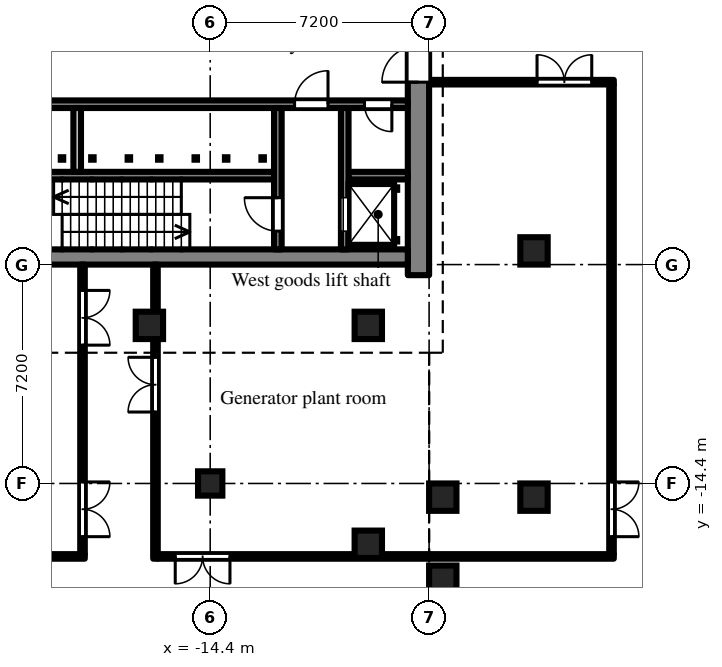
"""IFC4 building model, lengths in metres.
Left out: names, types, materials, properties, quantities, classifications, styles, units other than length and angle.
Written with IfcOpenShell. Run it as: python <this file> out.ifc"""

import sys

from ifc_helpers import new_model, si_unit, direction, frame, frame_2d, origin, origin_2d, place, context, subcontext, project, spatial, rectangle, extrude, element, fill, save


model = new_model("IFC4")
c1 = context("Model", 3, precision=1e-05, world=origin(), true_north=direction((0.0, 1.0)))
c2 = subcontext(c1, "Body", "Model", "MODEL_VIEW")
j1 = project(units=[si_unit("LENGTHUNIT", "METRE"), si_unit("PLANEANGLEUNIT", "RADIAN")], contexts=[c1])
p1 = place(None, origin())
s1 = spatial("IfcSite", under=j1, at=p1, CompositionType="ELEMENT")
p2 = place(p1, origin())
s2 = spatial("IfcBuilding", under=s1, at=p2, CompositionType="ELEMENT")
p3 = place(p2, frame((0.0, 0.0, -4.8)))
s3 = spatial("IfcBuildingStorey", under=s2, at=p3, CompositionType="ELEMENT", Elevation=-4.8)
for number, where, z_axis, x_axis in (
    (1, (-6.75, -17.55, -0.5), (0.0, 0.0, 1.0), (1.0, 0.0, 0.0)),
    (2, (-6.75, -14.85, -0.5), (0.0, 0.0, 1.0), (1.0, 0.0, 0.0)),
    (3, (-3.75, -14.85, -0.5), (0.0, 0.0, 1.0), (1.0, 0.0, 0.0)),
    (4, (-3.75, -6.75, -0.5), (0.0, 0.0, 1.0), (1.0, 0.0, 0.0)),
):
    element("IfcColumn", number, at=place(p3, frame(where, z_axis=z_axis, x_axis=x_axis)), inside=s3, PredefinedType="COLUMN", context=c2, shape_type="SweptSolid", body=[
        extrude(rectangle(XDim=0.9, YDim=0.9, at=origin_2d()), origin(), (0.0, 0.0, 1.0), 5.3),
    ])
p4 = place(p3, frame((-14.4, -14.4, -0.5), z_axis=(0.0, 0.0, 1.0), x_axis=(1.0, 0.0, 0.0)))
e5 = element("IfcColumn", 5, at=p4, inside=s3, PredefinedType="COLUMN", context=c2, shape_type="SweptSolid", body=[
    extrude(rectangle(XDim=0.8, YDim=0.8, at=origin_2d()), origin(), (0.0, 0.0, 1.0), 5.3),
])
for number, where, z_axis, x_axis in (
    (6, (-16.4, -9.2, -0.5), (0.0, 0.0, 1.0), (1.0, 0.0, 0.0)),
    (7, (-9.2, -16.4, -0.5), (0.0, 0.0, 1.0), (1.0, 0.0, 0.0)),
    (8, (-9.2, -9.2, -0.5), (0.0, 0.0, 1.0), (1.0, 0.0, 0.0)),
):
    element("IfcColumn", number, at=place(p3, frame(where, z_axis=z_axis, x_axis=x_axis)), inside=s3, PredefinedType="COLUMN", context=c2, shape_type="SweptSolid", body=[
        extrude(rectangle(XDim=0.9, YDim=0.9, at=origin_2d()), origin(), (0.0, 0.0, 1.0), 5.3),
    ])
p5 = place(p3, frame((-7.55, -7.548, 0.0), z_axis=(0.0, 0.0, 1.0), x_axis=(0.0, 1.0, 0.0)))
e9 = element("IfcWall", 9, at=p5, inside=s3, PredefinedType="SHEAR", context=c2, shape_type="SweptSolid", body=[
    extrude(rectangle(XDim=15.096, YDim=0.7, at=frame_2d((7.548, 0.0))), origin(), (0.0, 0.0, 1.0), 4.35),
])
p6 = place(p5, frame((6.348, 0.0, 0.0)))
e10 = element("IfcOpeningElement", 10, at=p6, cuts=e9, PredefinedType="OPENING", context=c2, shape_type="SweptSolid", body=[
    extrude(rectangle(XDim=2.4, YDim=2.2, at=frame_2d((1.2, 1.1))), frame((0.0, 0.36, 0.0), z_axis=(0.0, -1.0, 0.0), x_axis=(1.0, 0.0, 0.0)), (0.0, 0.0, 1.0), 0.72),
])
p7 = place(p3, frame((-7.9, -6.95, 0.0), z_axis=(0.0, 0.0, 1.0), x_axis=(-1.0, 0.0, 0.0)))
e11 = element("IfcWall", 11, at=p7, inside=s3, PredefinedType="SHEAR", context=c2, shape_type="SweptSolid", body=[
    extrude(rectangle(XDim=12.95, YDim=0.5, at=frame_2d((6.475, 0.0))), origin(), (0.0, 0.0, 1.0), 4.35),
])
p8 = place(p3, frame((-7.9, -1.925, 0.0), z_axis=(0.0, 0.0, 1.0), x_axis=(-1.0, 0.0, 0.0)))
e12 = element("IfcWall", 12, at=p8, inside=s3, PredefinedType="SHEAR", context=c2, shape_type="SweptSolid", body=[
    extrude(rectangle(XDim=12.95, YDim=0.25, at=frame_2d((6.475, 0.0))), origin(), (0.0, 0.0, 1.0), 4.35),
])
p9 = place(p8, frame((0.525, 0.0, 0.0)))
e13 = element("IfcOpeningElement", 13, at=p9, cuts=e12, PredefinedType="OPENING", context=c2, shape_type="SweptSolid", body=[
    extrude(rectangle(XDim=0.9, YDim=2.1, at=frame_2d((0.45, 1.05))), frame((0.0, 0.135, 0.0), z_axis=(0.0, -1.0, 0.0), x_axis=(1.0, 0.0, 0.0)), (0.0, 0.0, 1.0), 0.27),
])
p10 = place(p8, frame((2.625, 0.0, 0.0)))
e14 = element("IfcOpeningElement", 14, at=p10, cuts=e12, PredefinedType="OPENING", context=c2, shape_type="SweptSolid", body=[
    extrude(rectangle(XDim=1.1, YDim=2.1, at=frame_2d((0.55, 1.05))), frame((0.0, 0.135, 0.0), z_axis=(0.0, -1.0, 0.0), x_axis=(1.0, 0.0, 0.0)), (0.0, 0.0, 1.0), 0.27),
])
p11 = place(p3, frame((-7.9, -4.275, 0.0), z_axis=(0.0, 0.0, 1.0), x_axis=(-1.0, 0.0, 0.0)))
e15 = element("IfcWall", 15, at=p11, inside=s3, PredefinedType="SHEAR", context=c2, shape_type="SweptSolid", body=[
    extrude(rectangle(XDim=1.95, YDim=0.25, at=frame_2d((0.975, 0.0))), origin(), (0.0, 0.0, 1.0), 4.35),
])
p12 = place(p3, frame((-12.3, -4.275, 0.0), z_axis=(0.0, 0.0, 1.0), x_axis=(-1.0, 0.0, 0.0)))
e16 = element("IfcWall", 16, at=p12, inside=s3, PredefinedType="SHEAR", context=c2, shape_type="SweptSolid", body=[
    extrude(rectangle(XDim=8.55, YDim=0.25, at=frame_2d((4.275, 0.0))), origin(), (0.0, 0.0, 1.0), 4.35),
])
p13 = place(p3, frame((-9.975, -2.05, 0.0), z_axis=(0.0, 0.0, 1.0), x_axis=(0.0, -1.0, 0.0)))
e17 = element("IfcWall", 17, at=p13, inside=s3, PredefinedType="SHEAR", context=c2, shape_type="SweptSolid", body=[
    extrude(rectangle(XDim=4.65, YDim=0.25, at=frame_2d((2.325, 0.0))), origin(), (0.0, 0.0, 1.0), 4.35),
])
p14 = place(p13, frame((2.95, 0.0, 0.0)))
e18 = element("IfcOpeningElement", 18, at=p14, cuts=e17, PredefinedType="OPENING", context=c2, shape_type="SweptSolid", body=[
    extrude(rectangle(XDim=1.1, YDim=2.1, at=frame_2d((0.55, 1.05))), frame((0.0, 0.135, 0.0), z_axis=(0.0, -1.0, 0.0), x_axis=(1.0, 0.0, 0.0)), (0.0, 0.0, 1.0), 0.27),
])
p15 = place(p3, frame((-12.175, -2.05, 0.0), z_axis=(0.0, 0.0, 1.0), x_axis=(0.0, -1.0, 0.0)))
e19 = element("IfcWall", 19, at=p15, inside=s3, PredefinedType="SHEAR", context=c2, shape_type="SweptSolid", body=[
    extrude(rectangle(XDim=4.65, YDim=0.25, at=frame_2d((2.325, 0.0))), origin(), (0.0, 0.0, 1.0), 4.35),
])
p16 = place(p15, frame((2.95, 0.0, 0.0)))
e20 = element("IfcOpeningElement", 20, at=p16, cuts=e19, PredefinedType="OPENING", context=c2, shape_type="SweptSolid", body=[
    extrude(rectangle(XDim=1.1, YDim=2.1, at=frame_2d((0.55, 1.05))), frame((0.0, 0.135, 0.0), z_axis=(0.0, -1.0, 0.0), x_axis=(1.0, 0.0, 0.0)), (0.0, 0.0, 1.0), 0.27),
])
p17 = place(p3, frame((-18.775, -2.05, 0.0), z_axis=(0.0, 0.0, 1.0), x_axis=(0.0, -1.0, 0.0)))
e21 = element("IfcWall", 21, at=p17, inside=s3, PredefinedType="PARTITIONING", context=c2, shape_type="SweptSolid", body=[
    extrude(rectangle(XDim=2.1, YDim=0.25, at=frame_2d((1.05, 0.0))), origin(), (0.0, 0.0, 1.0), 4.35),
])
p18 = place(p3, frame((-31.125, -16.8, 0.0), z_axis=(0.0, 0.0, 1.0), x_axis=(1.0, 0.0, 0.0)))
e22 = element("IfcWall", 22, at=p18, inside=s3, PredefinedType="PARTITIONING", context=c2, shape_type="SweptSolid", body=[
    extrude(rectangle(XDim=12.6, YDim=0.15, at=frame_2d((6.3, 0.0))), origin(), (0.0, 0.0, 1.0), 4.35),
])
p19 = place(p18, frame((0.575, 0.0, 0.0)))
e23 = element("IfcOpeningElement", 23, at=p19, cuts=e22, PredefinedType="OPENING", context=c2, shape_type="SweptSolid", body=[
    extrude(rectangle(XDim=1.8, YDim=2.1, at=frame_2d((0.9, 1.05))), frame((0.0, 0.085, 0.0), z_axis=(0.0, -1.0, 0.0), x_axis=(1.0, 0.0, 0.0)), (0.0, 0.0, 1.0), 0.17),
])
p20 = place(p3, frame((-18.6, -16.725, 0.0), z_axis=(0.0, 0.0, 1.0), x_axis=(0.0, 1.0, 0.0)))
e24 = element("IfcWall", 24, at=p20, inside=s3, PredefinedType="PARTITIONING", context=c2, shape_type="SweptSolid", body=[
    extrude(rectangle(XDim=9.525, YDim=0.15, at=frame_2d((4.763, 0.0))), origin(), (0.0, 0.0, 1.0), 4.35),
])
p21 = place(p20, frame((0.575, 0.0, 0.0)))
e25 = element("IfcOpeningElement", 25, at=p21, cuts=e24, PredefinedType="OPENING", context=c2, shape_type="SweptSolid", body=[
    extrude(rectangle(XDim=1.8, YDim=2.1, at=frame_2d((0.9, 1.05))), frame((0.0, 0.085, 0.0), z_axis=(0.0, -1.0, 0.0), x_axis=(1.0, 0.0, 0.0)), (0.0, 0.0, 1.0), 0.17),
])
p22 = place(p20, frame((6.875, 0.0, 0.0)))
e26 = element("IfcOpeningElement", 26, at=p22, cuts=e24, PredefinedType="OPENING", context=c2, shape_type="SweptSolid", body=[
    extrude(rectangle(XDim=1.8, YDim=2.1, at=frame_2d((0.9, 1.05))), frame((0.0, 0.085, 0.0), z_axis=(0.0, -1.0, 0.0), x_axis=(1.0, 0.0, 0.0)), (0.0, 0.0, 1.0), 0.17),
])
p23 = place(p3, frame((-16.2, -16.875, 0.0), z_axis=(0.0, 0.0, 1.0), x_axis=(0.0, 1.0, 0.0)))
e27 = element("IfcWall", 27, at=p23, inside=s3, PredefinedType="PARTITIONING", context=c2, shape_type="SweptSolid", body=[
    extrude(rectangle(XDim=9.675, YDim=0.15, at=frame_2d((4.837, 0.0))), origin(), (0.0, 0.0, 1.0), 4.35),
])
p24 = place(p23, frame((4.825, 0.0, 0.0)))
e28 = element("IfcOpeningElement", 28, at=p24, cuts=e27, PredefinedType="OPENING", context=c2, shape_type="SweptSolid", body=[
    extrude(rectangle(XDim=1.8, YDim=2.1, at=frame_2d((0.9, 1.05))), frame((0.0, 0.085, 0.0), z_axis=(0.0, -1.0, 0.0), x_axis=(1.0, 0.0, 0.0)), (0.0, 0.0, 1.0), 0.17),
])
p25 = place(p3, frame((-16.125, -16.8, 0.0), z_axis=(0.0, 0.0, 1.0), x_axis=(1.0, 0.0, 0.0)))
e29 = element("IfcWall", 29, at=p25, inside=s3, PredefinedType="PARTITIONING", context=c2, shape_type="SweptSolid", body=[
    extrude(rectangle(XDim=15.0, YDim=0.15, at=frame_2d((7.5, 0.0))), origin(), (0.0, 0.0, 1.0), 4.35),
])
p26 = place(p25, frame((0.575, 0.0, 0.0)))
e30 = element("IfcOpeningElement", 30, at=p26, cuts=e29, PredefinedType="OPENING", context=c2, shape_type="SweptSolid", body=[
    extrude(rectangle(XDim=1.8, YDim=2.1, at=frame_2d((0.9, 1.05))), frame((0.0, 0.085, 0.0), z_axis=(0.0, -1.0, 0.0), x_axis=(1.0, 0.0, 0.0)), (0.0, 0.0, 1.0), 0.17),
])
p27 = place(p3, frame((-7.2, -1.2, 0.0), z_axis=(0.0, 0.0, 1.0), x_axis=(1.0, 0.0, 0.0)))
e31 = element("IfcWall", 31, at=p27, inside=s3, PredefinedType="PARTITIONING", context=c2, shape_type="SweptSolid", body=[
    extrude(rectangle(XDim=6.075, YDim=0.15, at=frame_2d((3.038, 0.0))), origin(), (0.0, 0.0, 1.0), 4.35),
])
p28 = place(p27, frame((3.55, 0.0, 0.0)))
e32 = element("IfcOpeningElement", 32, at=p28, cuts=e31, PredefinedType="OPENING", context=c2, shape_type="SweptSolid", body=[
    extrude(rectangle(XDim=1.8, YDim=2.1, at=frame_2d((0.9, 1.05))), frame((0.0, 0.085, 0.0), z_axis=(0.0, -1.0, 0.0), x_axis=(1.0, 0.0, 0.0)), (0.0, 0.0, 1.0), 0.17),
])
p29 = place(p3, frame((-1.2, -16.725, 0.0), z_axis=(0.0, 0.0, 1.0), x_axis=(0.0, 1.0, 0.0)))
e33 = element("IfcWall", 33, at=p29, inside=s3, PredefinedType="PARTITIONING", context=c2, shape_type="SweptSolid", body=[
    extrude(rectangle(XDim=15.45, YDim=0.15, at=frame_2d((7.725, 0.0))), origin(), (0.0, 0.0, 1.0), 4.35),
])
p30 = place(p29, frame((0.575, 0.0, 0.0)))
e34 = element("IfcOpeningElement", 34, at=p30, cuts=e33, PredefinedType="OPENING", context=c2, shape_type="SweptSolid", body=[
    extrude(rectangle(XDim=1.8, YDim=2.1, at=frame_2d((0.9, 1.05))), frame((0.0, 0.085, 0.0), z_axis=(0.0, -1.0, 0.0), x_axis=(1.0, 0.0, 0.0)), (0.0, 0.0, 1.0), 0.17),
])
p31 = place(p14, origin())
e35 = element("IfcDoor", 35, at=p31, inside=s3, OperationType="SLIDING_TO_LEFT", PredefinedType="DOOR", context=c2, shape_type="SweptSolid", body=[
    extrude(rectangle(XDim=1.1, YDim=2.1, at=frame_2d((0.55, 1.05))), frame((0.0, 0.025, 0.0), z_axis=(0.0, -1.0, 0.0), x_axis=(1.0, 0.0, 0.0)), (0.0, 0.0, 1.0), 0.05),
])
fill(e18, e35)
p32 = place(p16, frame((1.1, 0.0, 0.0), z_axis=(0.0, 0.0, 1.0), x_axis=(-1.0, 0.0, 0.0)))
e36 = element("IfcDoor", 36, at=p32, inside=s3, OperationType="SINGLE_SWING_RIGHT", PredefinedType="DOOR", context=c2, shape_type="SweptSolid", body=[
    extrude(rectangle(XDim=1.1, YDim=2.1, at=frame_2d((0.55, 1.05))), frame((0.0, 0.025, 0.0), z_axis=(0.0, -1.0, 0.0), x_axis=(1.0, 0.0, 0.0)), (0.0, 0.0, 1.0), 0.05),
])
fill(e20, e36)
p33 = place(p9, origin())
e37 = element("IfcDoor", 37, at=p33, inside=s3, OperationType="SINGLE_SWING_LEFT", PredefinedType="DOOR", context=c2, shape_type="SweptSolid", body=[
    extrude(rectangle(XDim=0.9, YDim=2.1, at=frame_2d((0.45, 1.05))), frame((0.0, 0.025, 0.0), z_axis=(0.0, -1.0, 0.0), x_axis=(1.0, 0.0, 0.0)), (0.0, 0.0, 1.0), 0.05),
])
fill(e13, e37)
p34 = place(p10, frame((1.1, 0.0, 0.0), z_axis=(0.0, 0.0, 1.0), x_axis=(-1.0, 0.0, 0.0)))
e38 = element("IfcDoor", 38, at=p34, inside=s3, OperationType="SINGLE_SWING_RIGHT", PredefinedType="DOOR", context=c2, shape_type="SweptSolid", body=[
    extrude(rectangle(XDim=1.1, YDim=2.1, at=frame_2d((0.55, 1.05))), frame((0.0, 0.025, 0.0), z_axis=(0.0, -1.0, 0.0), x_axis=(1.0, 0.0, 0.0)), (0.0, 0.0, 1.0), 0.05),
])
fill(e14, e38)
p35 = place(p6, origin())
e39 = element("IfcDoor", 39, at=p35, inside=s3, OperationType="DOUBLE_DOOR_DOUBLE_SWING", PredefinedType="DOOR", context=c2, shape_type="SweptSolid", body=[
    extrude(rectangle(XDim=2.4, YDim=2.2, at=frame_2d((1.2, 1.1))), frame((0.0, 0.025, 0.0), z_axis=(0.0, -1.0, 0.0), x_axis=(1.0, 0.0, 0.0)), (0.0, 0.0, 1.0), 0.05),
])
fill(e10, e39)
p36 = place(p24, origin())
e40 = element("IfcDoor", 40, at=p36, inside=s3, OperationType="DOUBLE_DOOR_DOUBLE_SWING", PredefinedType="DOOR", context=c2, shape_type="SweptSolid", body=[
    extrude(rectangle(XDim=1.8, YDim=2.1, at=frame_2d((0.9, 1.05))), frame((0.0, 0.025, 0.0), z_axis=(0.0, -1.0, 0.0), x_axis=(1.0, 0.0, 0.0)), (0.0, 0.0, 1.0), 0.05),
])
fill(e28, e40)
p37 = place(p26, frame((1.8, 0.0, 0.0), z_axis=(0.0, 0.0, 1.0), x_axis=(-1.0, 0.0, 0.0)))
e41 = element("IfcDoor", 41, at=p37, inside=s3, OperationType="DOUBLE_DOOR_DOUBLE_SWING", PredefinedType="DOOR", context=c2, shape_type="SweptSolid", body=[
    extrude(rectangle(XDim=1.8, YDim=2.1, at=frame_2d((0.9, 1.05))), frame((0.0, 0.025, 0.0), z_axis=(0.0, -1.0, 0.0), x_axis=(1.0, 0.0, 0.0)), (0.0, 0.0, 1.0), 0.05),
])
fill(e30, e41)
p38 = place(p28, origin())
e42 = element("IfcDoor", 42, at=p38, inside=s3, OperationType="DOUBLE_DOOR_DOUBLE_SWING", PredefinedType="DOOR", context=c2, shape_type="SweptSolid", body=[
    extrude(rectangle(XDim=1.8, YDim=2.1, at=frame_2d((0.9, 1.05))), frame((0.0, 0.025, 0.0), z_axis=(0.0, -1.0, 0.0), x_axis=(1.0, 0.0, 0.0)), (0.0, 0.0, 1.0), 0.05),
])
fill(e32, e42)
p39 = place(p30, frame((1.8, 0.0, 0.0), z_axis=(0.0, 0.0, 1.0), x_axis=(-1.0, 0.0, 0.0)))
e43 = element("IfcDoor", 43, at=p39, inside=s3, OperationType="DOUBLE_DOOR_DOUBLE_SWING", PredefinedType="DOOR", context=c2, shape_type="SweptSolid", body=[
    extrude(rectangle(XDim=1.8, YDim=2.1, at=frame_2d((0.9, 1.05))), frame((0.0, 0.025, 0.0), z_axis=(0.0, -1.0, 0.0), x_axis=(1.0, 0.0, 0.0)), (0.0, 0.0, 1.0), 0.05),
])
fill(e34, e43)
p40 = place(p21, frame((1.8, 0.0, 0.0), z_axis=(0.0, 0.0, 1.0), x_axis=(-1.0, 0.0, 0.0)))
e44 = element("IfcDoor", 44, at=p40, inside=s3, OperationType="DOUBLE_DOOR_DOUBLE_SWING", PredefinedType="DOOR", context=c2, shape_type="SweptSolid", body=[
    extrude(rectangle(XDim=1.8, YDim=2.1, at=frame_2d((0.9, 1.05))), frame((0.0, 0.025, 0.0), z_axis=(0.0, -1.0, 0.0), x_axis=(1.0, 0.0, 0.0)), (0.0, 0.0, 1.0), 0.05),
])
fill(e25, e44)
p41 = place(p22, frame((1.8, 0.0, 0.0), z_axis=(0.0, 0.0, 1.0), x_axis=(-1.0, 0.0, 0.0)))
e45 = element("IfcDoor", 45, at=p41, inside=s3, OperationType="DOUBLE_DOOR_DOUBLE_SWING", PredefinedType="DOOR", context=c2, shape_type="SweptSolid", body=[
    extrude(rectangle(XDim=1.8, YDim=2.1, at=frame_2d((0.9, 1.05))), frame((0.0, 0.025, 0.0), z_axis=(0.0, -1.0, 0.0), x_axis=(1.0, 0.0, 0.0)), (0.0, 0.0, 1.0), 0.05),
])
fill(e26, e45)
save(model, sys.argv[1])
